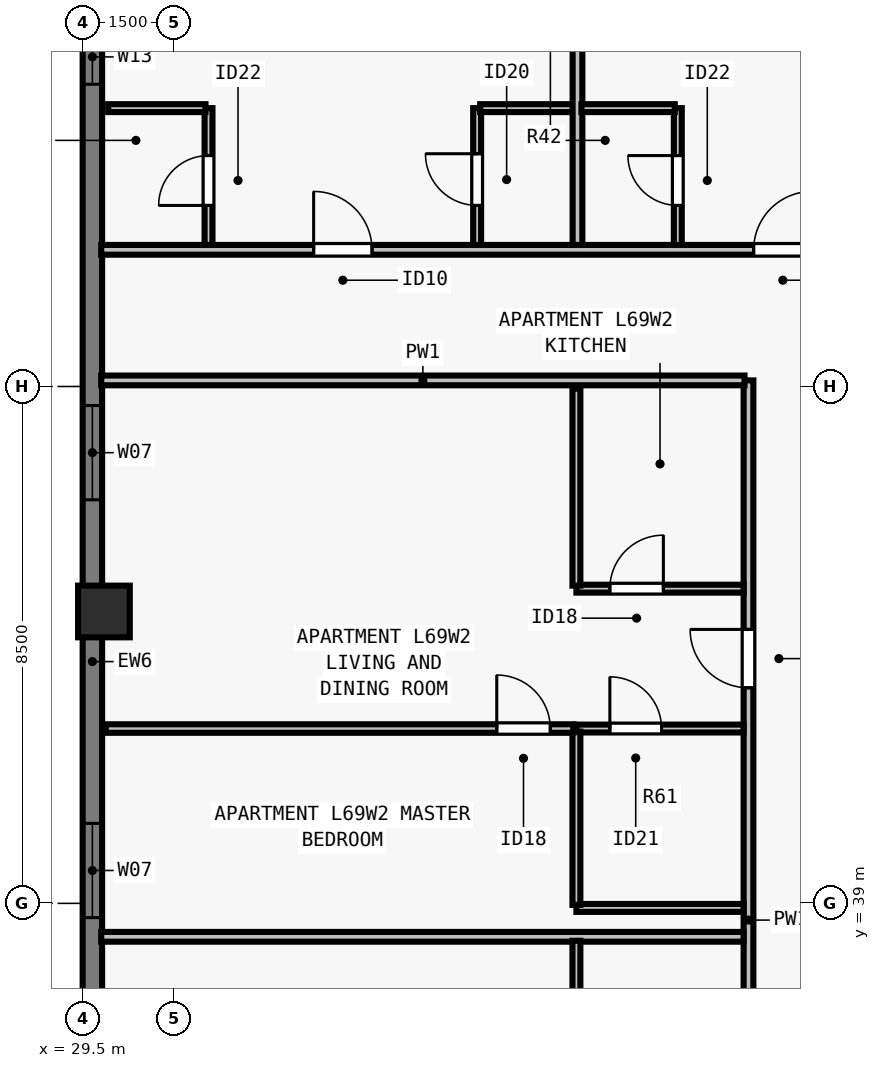
"""IFC4 building model, lengths in metres.
Left out: names, types, materials, properties, quantities, classifications, styles, units other than length and angle.
Written with IfcOpenShell. Run it as: python <this file> out.ifc"""

import sys

from ifc_helpers import new_model, si_unit, direction, frame, frame_2d, origin, origin_2d, place, context, subcontext, project, spatial, rectangle, extrude, element, fill, save


model = new_model("IFC4")
c1 = context("Model", 3, precision=1e-05, world=origin(), true_north=direction((0.0, 1.0)))
c2 = subcontext(c1, "Body", "Model", "MODEL_VIEW")
j1 = project(units=[si_unit("LENGTHUNIT", "METRE"), si_unit("PLANEANGLEUNIT", "RADIAN")], contexts=[c1])
p1 = place(None, origin())
s1 = spatial("IfcSite", under=j1, at=p1, CompositionType="ELEMENT")
p2 = place(p1, origin())
s2 = spatial("IfcBuilding", under=s1, at=p2, CompositionType="ELEMENT")
p3 = place(p2, frame((0.0, 0.0, 251.5)))
s3 = spatial("IfcBuildingStorey", under=s2, at=p3, CompositionType="ELEMENT", Elevation=251.5)
p4 = place(p3, frame((29.85, 43.8, 0.0), z_axis=(0.0, 0.0, 1.0), x_axis=(0.0, 1.0, 0.0)))
e1 = element("IfcColumn", 1, at=p4, inside=s3, PredefinedType="COLUMN", context=c2, shape_type="SweptSolid", body=[
    extrude(rectangle(XDim=0.85, YDim=0.85, at=origin_2d()), origin(), (0.0, 0.0, 1.0), 3.5),
])
p5 = place(p3, frame((29.66, 32.8, 0.0), z_axis=(0.0, 0.0, 1.0), x_axis=(0.0, 1.0, 0.0)))
e2 = element("IfcWall", 2, at=p5, inside=s3, PredefinedType="SOLIDWALL", context=c2, shape_type="SweptSolid", body=[
    extrude(rectangle(XDim=23.402, YDim=0.32, at=frame_2d((11.701, 0.0))), origin(), (0.0, 0.0, 1.0), 3.29),
])
p6 = place(p5, frame((2.155, 0.0, 0.8)))
e3 = element("IfcOpeningElement", 3, at=p6, cuts=e2, PredefinedType="OPENING", context=c2, shape_type="SweptSolid", body=[
    extrude(rectangle(XDim=1.85, YDim=1.678, at=frame_2d((0.925, 0.839))), frame((0.0, 0.17, 0.0), z_axis=(0.0, -1.0, 0.0), x_axis=(1.0, 0.0, 0.0)), (0.0, 0.0, 1.0), 0.34),
])
p7 = place(p5, frame((5.966, 0.0, 0.8)))
e4 = element("IfcOpeningElement", 4, at=p7, cuts=e2, PredefinedType="OPENING", context=c2, shape_type="SweptSolid", body=[
    extrude(rectangle(XDim=1.55, YDim=1.678, at=frame_2d((0.775, 0.839))), frame((0.0, 0.17, 0.0), z_axis=(0.0, -1.0, 0.0), x_axis=(1.0, 0.0, 0.0)), (0.0, 0.0, 1.0), 0.34),
])
p8 = place(p5, frame((12.836, 0.0, 0.8)))
e5 = element("IfcOpeningElement", 5, at=p8, cuts=e2, PredefinedType="OPENING", context=c2, shape_type="SweptSolid", body=[
    extrude(rectangle(XDim=1.55, YDim=1.678, at=frame_2d((0.775, 0.839))), frame((0.0, 0.17, 0.0), z_axis=(0.0, -1.0, 0.0), x_axis=(1.0, 0.0, 0.0)), (0.0, 0.0, 1.0), 0.34),
])
p9 = place(p5, frame((19.67, 0.0, 0.8)))
e6 = element("IfcOpeningElement", 6, at=p9, cuts=e2, PredefinedType="OPENING", context=c2, shape_type="SweptSolid", body=[
    extrude(rectangle(XDim=0.9, YDim=1.678, at=frame_2d((0.45, 0.839))), frame((0.0, 0.17, 0.0), z_axis=(0.0, -1.0, 0.0), x_axis=(1.0, 0.0, 0.0)), (0.0, 0.0, 1.0), 0.34),
])
p10 = place(p3, frame((29.805, 49.748, 0.0), z_axis=(0.0, 0.0, 1.0), x_axis=(1.0, 0.0, 0.0)))
e7 = element("IfcWall", 7, at=p10, inside=s3, PredefinedType="PARTITIONING", context=c2, shape_type="SweptSolid", body=[
    extrude(rectangle(XDim=44.39, YDim=0.16, at=frame_2d((22.195, 0.0))), origin(), (0.0, 0.0, 1.0), 2.958),
])
p11 = place(p10, frame((3.494, 0.0, 0.0)))
e8 = element("IfcOpeningElement", 8, at=p11, cuts=e7, PredefinedType="OPENING", context=c2, shape_type="SweptSolid", body=[
    extrude(rectangle(XDim=0.96, YDim=2.18, at=frame_2d((0.48, 1.09))), frame((0.0, 0.09, 0.0), z_axis=(0.0, -1.0, 0.0), x_axis=(1.0, 0.0, 0.0)), (0.0, 0.0, 1.0), 0.18),
])
p12 = place(p10, frame((10.73, 0.0, 0.0)))
e9 = element("IfcOpeningElement", 9, at=p12, cuts=e7, PredefinedType="OPENING", context=c2, shape_type="SweptSolid", body=[
    extrude(rectangle(XDim=0.96, YDim=2.18, at=frame_2d((0.48, 1.09))), frame((0.0, 0.09, 0.0), z_axis=(0.0, -1.0, 0.0), x_axis=(1.0, 0.0, 0.0)), (0.0, 0.0, 1.0), 0.18),
])
p13 = place(p10, frame((18.09, 0.0, 0.0)))
e10 = element("IfcOpeningElement", 10, at=p13, cuts=e7, PredefinedType="OPENING", context=c2, shape_type="SweptSolid", body=[
    extrude(rectangle(XDim=0.96, YDim=2.18, at=frame_2d((0.48, 1.09))), frame((0.0, 0.09, 0.0), z_axis=(0.0, -1.0, 0.0), x_axis=(1.0, 0.0, 0.0)), (0.0, 0.0, 1.0), 0.18),
])
p14 = place(p10, frame((25.45, 0.0, 0.0)))
e11 = element("IfcOpeningElement", 11, at=p14, cuts=e7, PredefinedType="OPENING", context=c2, shape_type="SweptSolid", body=[
    extrude(rectangle(XDim=0.96, YDim=2.18, at=frame_2d((0.48, 1.09))), frame((0.0, 0.09, 0.0), z_axis=(0.0, -1.0, 0.0), x_axis=(1.0, 0.0, 0.0)), (0.0, 0.0, 1.0), 0.18),
])
p15 = place(p10, frame((32.81, 0.0, 0.0)))
e12 = element("IfcOpeningElement", 12, at=p15, cuts=e7, PredefinedType="OPENING", context=c2, shape_type="SweptSolid", body=[
    extrude(rectangle(XDim=0.96, YDim=2.18, at=frame_2d((0.48, 1.09))), frame((0.0, 0.09, 0.0), z_axis=(0.0, -1.0, 0.0), x_axis=(1.0, 0.0, 0.0)), (0.0, 0.0, 1.0), 0.18),
])
p16 = place(p10, frame((40.294, 0.0, 0.0)))
e13 = element("IfcOpeningElement", 13, at=p16, cuts=e7, PredefinedType="OPENING", context=c2, shape_type="SweptSolid", body=[
    extrude(rectangle(XDim=0.96, YDim=2.18, at=frame_2d((0.48, 1.09))), frame((0.0, 0.09, 0.0), z_axis=(0.0, -1.0, 0.0), x_axis=(1.0, 0.0, 0.0)), (0.0, 0.0, 1.0), 0.18),
])
p17 = place(p3, frame((40.45, 30.4, 0.0), z_axis=(0.0, 0.0, 1.0), x_axis=(0.0, 1.0, 0.0)))
e14 = element("IfcWall", 14, at=p17, inside=s3, PredefinedType="PARTITIONING", context=c2, shape_type="SweptSolid", body=[
    extrude(rectangle(XDim=17.2, YDim=0.16, at=frame_2d((8.6, 0.0))), origin(), (0.0, 0.0, 1.0), 3.29),
])
p18 = place(p17, frame((3.545, 0.0, 0.0)))
e15 = element("IfcOpeningElement", 15, at=p18, cuts=e14, PredefinedType="OPENING", context=c2, shape_type="SweptSolid", body=[
    extrude(rectangle(XDim=0.96, YDim=2.18, at=frame_2d((0.48, 1.09))), frame((0.0, 0.09, 0.0), z_axis=(0.0, -1.0, 0.0), x_axis=(1.0, 0.0, 0.0)), (0.0, 0.0, 1.0), 0.18),
])
p19 = place(p17, frame((12.145, 0.0, 0.0)))
e16 = element("IfcOpeningElement", 16, at=p19, cuts=e14, PredefinedType="OPENING", context=c2, shape_type="SweptSolid", body=[
    extrude(rectangle(XDim=0.96, YDim=2.18, at=frame_2d((0.48, 1.09))), frame((0.0, 0.09, 0.0), z_axis=(0.0, -1.0, 0.0), x_axis=(1.0, 0.0, 0.0)), (0.0, 0.0, 1.0), 0.18),
])
p20 = place(p3, frame((29.805, 47.6, 0.0), z_axis=(0.0, 0.0, 1.0), x_axis=(1.0, 0.0, 0.0)))
e17 = element("IfcWall", 17, at=p20, inside=s3, PredefinedType="PARTITIONING", context=c2, shape_type="SweptSolid", body=[
    extrude(rectangle(XDim=10.58, YDim=0.16, at=frame_2d((5.29, 0.0))), origin(), (0.0, 0.0, 1.0), 3.29),
])
p21 = place(p3, frame((31.57, 49.827, 0.0), z_axis=(0.0, 0.0, 1.0), x_axis=(0.0, 1.0, 0.0)))
e18 = element("IfcWall", 18, at=p21, inside=s3, PredefinedType="PLUMBINGWALL", context=c2, shape_type="SweptSolid", body=[
    extrude(rectangle(XDim=2.25, YDim=0.13, at=frame_2d((1.125, 0.0))), origin(), (0.0, 0.0, 1.0), 3.29),
])
p22 = place(p21, frame((0.65, 0.0, 0.0)))
e19 = element("IfcOpeningElement", 19, at=p22, cuts=e18, PredefinedType="OPENING", context=c2, shape_type="SweptSolid", body=[
    extrude(rectangle(XDim=0.82, YDim=2.1, at=frame_2d((0.41, 1.05))), frame((0.0, 0.075, 0.0), z_axis=(0.0, -1.0, 0.0), x_axis=(1.0, 0.0, 0.0)), (0.0, 0.0, 1.0), 0.15),
])
p23 = place(p3, frame((29.92, 52.077, 0.0), z_axis=(0.0, 0.0, 1.0), x_axis=(1.0, 0.0, 0.0)))
e20 = element("IfcWall", 20, at=p23, inside=s3, PredefinedType="PLUMBINGWALL", context=c2, shape_type="SweptSolid", body=[
    extrude(rectangle(XDim=1.6, YDim=0.13, at=frame_2d((0.8, 0.0))), origin(), (0.0, 0.0, 1.0), 3.29),
])
p24 = place(p3, frame((35.988, 49.827, 0.0), z_axis=(0.0, 0.0, 1.0), x_axis=(0.0, 1.0, 0.0)))
e21 = element("IfcWall", 21, at=p24, inside=s3, PredefinedType="PLUMBINGWALL", context=c2, shape_type="SweptSolid", body=[
    extrude(rectangle(XDim=2.25, YDim=0.13, at=frame_2d((1.125, 0.0))), origin(), (0.0, 0.0, 1.0), 3.29),
])
p25 = place(p24, frame((0.65, 0.0, 0.0)))
e22 = element("IfcOpeningElement", 22, at=p25, cuts=e21, PredefinedType="OPENING", context=c2, shape_type="SweptSolid", body=[
    extrude(rectangle(XDim=0.85, YDim=2.1, at=frame_2d((0.425, 1.05))), frame((0.0, 0.075, 0.0), z_axis=(0.0, -1.0, 0.0), x_axis=(1.0, 0.0, 0.0)), (0.0, 0.0, 1.0), 0.15),
])
p26 = place(p3, frame((36.038, 52.077, 0.0), z_axis=(0.0, 0.0, 1.0), x_axis=(1.0, 0.0, 0.0)))
e23 = element("IfcWall", 23, at=p26, inside=s3, PredefinedType="PLUMBINGWALL", context=c2, shape_type="SweptSolid", body=[
    extrude(rectangle(XDim=1.6, YDim=0.13, at=frame_2d((0.8, 0.0))), origin(), (0.0, 0.0, 1.0), 2.958),
])
p27 = place(p3, frame((37.637, 49.827, 0.0), z_axis=(0.0, 0.0, 1.0), x_axis=(0.0, 1.0, 0.0)))
e24 = element("IfcWall", 24, at=p27, inside=s3, PredefinedType="PARTITIONING", context=c2, shape_type="SweptSolid", body=[
    extrude(rectangle(XDim=11.368, YDim=0.16, at=frame_2d((5.684, 0.0))), origin(), (0.0, 0.0, 1.0), 2.573),
])
p28 = place(p3, frame((39.288, 49.827, 0.0), z_axis=(0.0, 0.0, 1.0), x_axis=(0.0, 1.0, 0.0)))
e25 = element("IfcWall", 25, at=p28, inside=s3, PredefinedType="PLUMBINGWALL", context=c2, shape_type="SweptSolid", body=[
    extrude(rectangle(XDim=2.25, YDim=0.13, at=frame_2d((1.125, 0.0))), origin(), (0.0, 0.0, 1.0), 3.29),
])
p29 = place(p28, frame((0.65, 0.0, 0.0)))
e26 = element("IfcOpeningElement", 26, at=p29, cuts=e25, PredefinedType="OPENING", context=c2, shape_type="SweptSolid", body=[
    extrude(rectangle(XDim=0.82, YDim=2.1, at=frame_2d((0.41, 1.05))), frame((0.0, 0.075, 0.0), z_axis=(0.0, -1.0, 0.0), x_axis=(1.0, 0.0, 0.0)), (0.0, 0.0, 1.0), 0.15),
])
p30 = place(p3, frame((37.702, 52.077, 0.0), z_axis=(0.0, 0.0, 1.0), x_axis=(1.0, 0.0, 0.0)))
e27 = element("IfcWall", 27, at=p30, inside=s3, PredefinedType="PLUMBINGWALL", context=c2, shape_type="SweptSolid", body=[
    extrude(rectangle(XDim=1.535, YDim=0.13, at=frame_2d((0.768, 0.0))), origin(), (0.0, 0.0, 1.0), 3.29),
])
p31 = place(p3, frame((29.805, 38.45, 0.0), z_axis=(0.0, 0.0, 1.0), x_axis=(1.0, 0.0, 0.0)))
e28 = element("IfcWall", 28, at=p31, inside=s3, PredefinedType="PARTITIONING", context=c2, shape_type="SweptSolid", body=[
    extrude(rectangle(XDim=10.565, YDim=0.16, at=frame_2d((5.283, 0.0))), origin(), (0.0, 0.0, 1.0), 2.958),
])
p32 = place(p3, frame((37.62, 35.625, 0.0), z_axis=(0.0, 0.0, 1.0), x_axis=(0.0, 1.0, 0.0)))
e29 = element("IfcWall", 29, at=p32, inside=s3, PredefinedType="PLUMBINGWALL", context=c2, shape_type="SweptSolid", body=[
    extrude(rectangle(XDim=2.76, YDim=0.13, at=frame_2d((1.38, 0.0))), origin(), (0.0, 0.0, 1.0), 3.29),
])
p33 = place(p3, frame((37.62, 38.925, 0.0), z_axis=(0.0, 0.0, 1.0), x_axis=(1.0, 0.0, 0.0)))
e30 = element("IfcWall", 30, at=p33, inside=s3, PredefinedType="PLUMBINGWALL", context=c2, shape_type="SweptSolid", body=[
    extrude(rectangle(XDim=2.75, YDim=0.13, at=frame_2d((1.375, 0.0))), origin(), (0.0, 0.0, 1.0), 3.29),
])
p34 = place(p3, frame((37.62, 41.875, 0.0), z_axis=(0.0, 0.0, 1.0), x_axis=(1.0, 0.0, 0.0)))
e31 = element("IfcWall", 31, at=p34, inside=s3, PredefinedType="PLUMBINGWALL", context=c2, shape_type="SweptSolid", body=[
    extrude(rectangle(XDim=2.75, YDim=0.13, at=frame_2d((1.375, 0.0))), origin(), (0.0, 0.0, 1.0), 2.958),
])
p35 = place(p34, frame((0.55, 0.0, 0.0)))
e32 = element("IfcOpeningElement", 32, at=p35, cuts=e31, PredefinedType="OPENING", context=c2, shape_type="SweptSolid", body=[
    extrude(rectangle(XDim=0.85, YDim=2.08, at=frame_2d((0.425, 1.04))), frame((0.0, 0.075, 0.0), z_axis=(0.0, -1.0, 0.0), x_axis=(1.0, 0.0, 0.0)), (0.0, 0.0, 1.0), 0.15),
])
p36 = place(p3, frame((37.62, 38.975, 0.0), z_axis=(0.0, 0.0, 1.0), x_axis=(0.0, 1.0, 0.0)))
e33 = element("IfcWall", 33, at=p36, inside=s3, PredefinedType="PLUMBINGWALL", context=c2, shape_type="SweptSolid", body=[
    extrude(rectangle(XDim=2.85, YDim=0.13, at=frame_2d((1.425, 0.0))), origin(), (0.0, 0.0, 1.0), 3.29),
])
p37 = place(p3, frame((37.62, 44.175, 0.0), z_axis=(0.0, 0.0, 1.0), x_axis=(1.0, 0.0, 0.0)))
e34 = element("IfcWall", 34, at=p37, inside=s3, PredefinedType="PLUMBINGWALL", context=c2, shape_type="SweptSolid", body=[
    extrude(rectangle(XDim=2.75, YDim=0.13, at=frame_2d((1.375, 0.0))), origin(), (0.0, 0.0, 1.0), 2.958),
])
p38 = place(p37, frame((0.55, 0.0, 0.0)))
e35 = element("IfcOpeningElement", 35, at=p38, cuts=e34, PredefinedType="OPENING", context=c2, shape_type="SweptSolid", body=[
    extrude(rectangle(XDim=0.88, YDim=2.1, at=frame_2d((0.44, 1.05))), frame((0.0, 0.075, 0.0), z_axis=(0.0, -1.0, 0.0), x_axis=(1.0, 0.0, 0.0)), (0.0, 0.0, 1.0), 0.15),
])
p39 = place(p3, frame((37.62, 44.225, 0.0), z_axis=(0.0, 0.0, 1.0), x_axis=(0.0, 1.0, 0.0)))
e36 = element("IfcWall", 36, at=p39, inside=s3, PredefinedType="PLUMBINGWALL", context=c2, shape_type="SweptSolid", body=[
    extrude(rectangle(XDim=3.24, YDim=0.13, at=frame_2d((1.62, 0.0))), origin(), (0.0, 0.0, 1.0), 3.29),
])
p40 = place(p3, frame((29.88, 41.875, 0.0), z_axis=(0.0, 0.0, 1.0), x_axis=(1.0, 0.0, 0.0)))
e37 = element("IfcWall", 37, at=p40, inside=s3, PredefinedType="PARTITIONING", context=c2, shape_type="SweptSolid", body=[
    extrude(rectangle(XDim=7.69, YDim=0.14, at=frame_2d((3.845, 0.0))), origin(), (0.0, 0.0, 1.0), 3.29),
])
p41 = place(p40, frame((6.43, 0.0, 0.0)))
e38 = element("IfcOpeningElement", 38, at=p41, cuts=e37, PredefinedType="OPENING", context=c2, shape_type="SweptSolid", body=[
    extrude(rectangle(XDim=0.88, YDim=2.1, at=frame_2d((0.44, 1.05))), frame((0.0, 0.08, 0.0), z_axis=(0.0, -1.0, 0.0), x_axis=(1.0, 0.0, 0.0)), (0.0, 0.0, 1.0), 0.16),
])
p42 = place(p7, origin())
e39 = element("IfcWindow", 39, at=p42, inside=s3, PartitioningType="SINGLE_PANEL", PredefinedType="WINDOW", context=c2, shape_type="SweptSolid", body=[
    extrude(rectangle(XDim=1.55, YDim=1.678, at=frame_2d((0.775, 0.839))), frame((0.0, -0.05, 0.0), z_axis=(0.0, -1.0, 0.0), x_axis=(1.0, 0.0, 0.0)), (0.0, 0.0, 1.0), 0.06),
])
fill(e4, e39)
p43 = place(p8, origin())
e40 = element("IfcWindow", 40, at=p43, inside=s3, PartitioningType="SINGLE_PANEL", PredefinedType="WINDOW", context=c2, shape_type="SweptSolid", body=[
    extrude(rectangle(XDim=1.55, YDim=1.678, at=frame_2d((0.775, 0.839))), frame((0.0, -0.05, 0.0), z_axis=(0.0, -1.0, 0.0), x_axis=(1.0, 0.0, 0.0)), (0.0, 0.0, 1.0), 0.06),
])
fill(e5, e40)
p44 = place(p9, origin())
e41 = element("IfcWindow", 41, at=p44, inside=s3, PartitioningType="SINGLE_PANEL", PredefinedType="WINDOW", context=c2, shape_type="SweptSolid", body=[
    extrude(rectangle(XDim=0.9, YDim=1.678, at=frame_2d((0.45, 0.839))), frame((0.0, -0.04, 0.0), z_axis=(0.0, -1.0, 0.0), x_axis=(1.0, 0.0, 0.0)), (0.0, 0.0, 1.0), 0.06),
])
fill(e6, e41)
p45 = place(p22, origin())
e42 = element("IfcDoor", 42, at=p45, inside=s3, OperationType="SINGLE_SWING_LEFT", PredefinedType="DOOR", context=c2, shape_type="SweptSolid", body=[
    extrude(rectangle(XDim=0.82, YDim=2.1, at=frame_2d((0.41, 1.05))), frame((0.0, 0.025, 0.0), z_axis=(0.0, -1.0, 0.0), x_axis=(1.0, 0.0, 0.0)), (0.0, 0.0, 1.0), 0.05),
])
fill(e19, e42)
p46 = place(p25, origin())
e43 = element("IfcDoor", 43, at=p46, inside=s3, OperationType="SINGLE_SWING_RIGHT", PredefinedType="DOOR", context=c2, shape_type="SweptSolid", body=[
    extrude(rectangle(XDim=0.85, YDim=2.1, at=frame_2d((0.425, 1.05))), frame((0.0, 0.025, 0.0), z_axis=(0.0, -1.0, 0.0), x_axis=(1.0, 0.0, 0.0)), (0.0, 0.0, 1.0), 0.05),
])
fill(e22, e43)
p47 = place(p11, origin())
e44 = element("IfcDoor", 44, at=p47, inside=s3, OperationType="SINGLE_SWING_LEFT", PredefinedType="DOOR", context=c2, shape_type="SweptSolid", body=[
    extrude(rectangle(XDim=0.96, YDim=2.18, at=frame_2d((0.48, 1.09))), frame((0.0, 0.025, 0.0), z_axis=(0.0, -1.0, 0.0), x_axis=(1.0, 0.0, 0.0)), (0.0, 0.0, 1.0), 0.05),
])
fill(e8, e44)
p48 = place(p29, origin())
e45 = element("IfcDoor", 45, at=p48, inside=s3, OperationType="SINGLE_SWING_RIGHT", PredefinedType="DOOR", context=c2, shape_type="SweptSolid", body=[
    extrude(rectangle(XDim=0.82, YDim=2.1, at=frame_2d((0.41, 1.05))), frame((0.0, 0.025, 0.0), z_axis=(0.0, -1.0, 0.0), x_axis=(1.0, 0.0, 0.0)), (0.0, 0.0, 1.0), 0.05),
])
fill(e26, e45)
p49 = place(p12, origin())
e46 = element("IfcDoor", 46, at=p49, inside=s3, OperationType="SINGLE_SWING_RIGHT", PredefinedType="DOOR", context=c2, shape_type="SweptSolid", body=[
    extrude(rectangle(XDim=0.96, YDim=2.18, at=frame_2d((0.48, 1.09))), frame((0.0, 0.025, 0.0), z_axis=(0.0, -1.0, 0.0), x_axis=(1.0, 0.0, 0.0)), (0.0, 0.0, 1.0), 0.05),
])
fill(e9, e46)
p50 = place(p35, origin())
e47 = element("IfcDoor", 47, at=p50, inside=s3, OperationType="SINGLE_SWING_LEFT", PredefinedType="DOOR", context=c2, shape_type="SweptSolid", body=[
    extrude(rectangle(XDim=0.85, YDim=2.08, at=frame_2d((0.425, 1.04))), frame((0.0, 0.025, 0.0), z_axis=(0.0, -1.0, 0.0), x_axis=(1.0, 0.0, 0.0)), (0.0, 0.0, 1.0), 0.05),
])
fill(e32, e47)
p51 = place(p38, origin())
e48 = element("IfcDoor", 48, at=p51, inside=s3, OperationType="SINGLE_SWING_RIGHT", PredefinedType="DOOR", context=c2, shape_type="SweptSolid", body=[
    extrude(rectangle(XDim=0.88, YDim=2.1, at=frame_2d((0.44, 1.05))), frame((0.0, 0.025, 0.0), z_axis=(0.0, -1.0, 0.0), x_axis=(1.0, 0.0, 0.0)), (0.0, 0.0, 1.0), 0.05),
])
fill(e35, e48)
p52 = place(p41, origin())
e49 = element("IfcDoor", 49, at=p52, inside=s3, OperationType="SINGLE_SWING_LEFT", PredefinedType="DOOR", context=c2, shape_type="SweptSolid", body=[
    extrude(rectangle(XDim=0.88, YDim=2.1, at=frame_2d((0.44, 1.05))), frame((0.0, 0.025, 0.0), z_axis=(0.0, -1.0, 0.0), x_axis=(1.0, 0.0, 0.0)), (0.0, 0.0, 1.0), 0.05),
])
fill(e38, e49)
p53 = place(p19, origin())
e50 = element("IfcDoor", 50, at=p53, inside=s3, OperationType="SINGLE_SWING_RIGHT", PredefinedType="DOOR", context=c2, shape_type="SweptSolid", body=[
    extrude(rectangle(XDim=0.96, YDim=2.18, at=frame_2d((0.48, 1.09))), frame((0.0, 0.025, 0.0), z_axis=(0.0, -1.0, 0.0), x_axis=(1.0, 0.0, 0.0)), (0.0, 0.0, 1.0), 0.05),
])
fill(e16, e50)
save(model, sys.argv[1])
